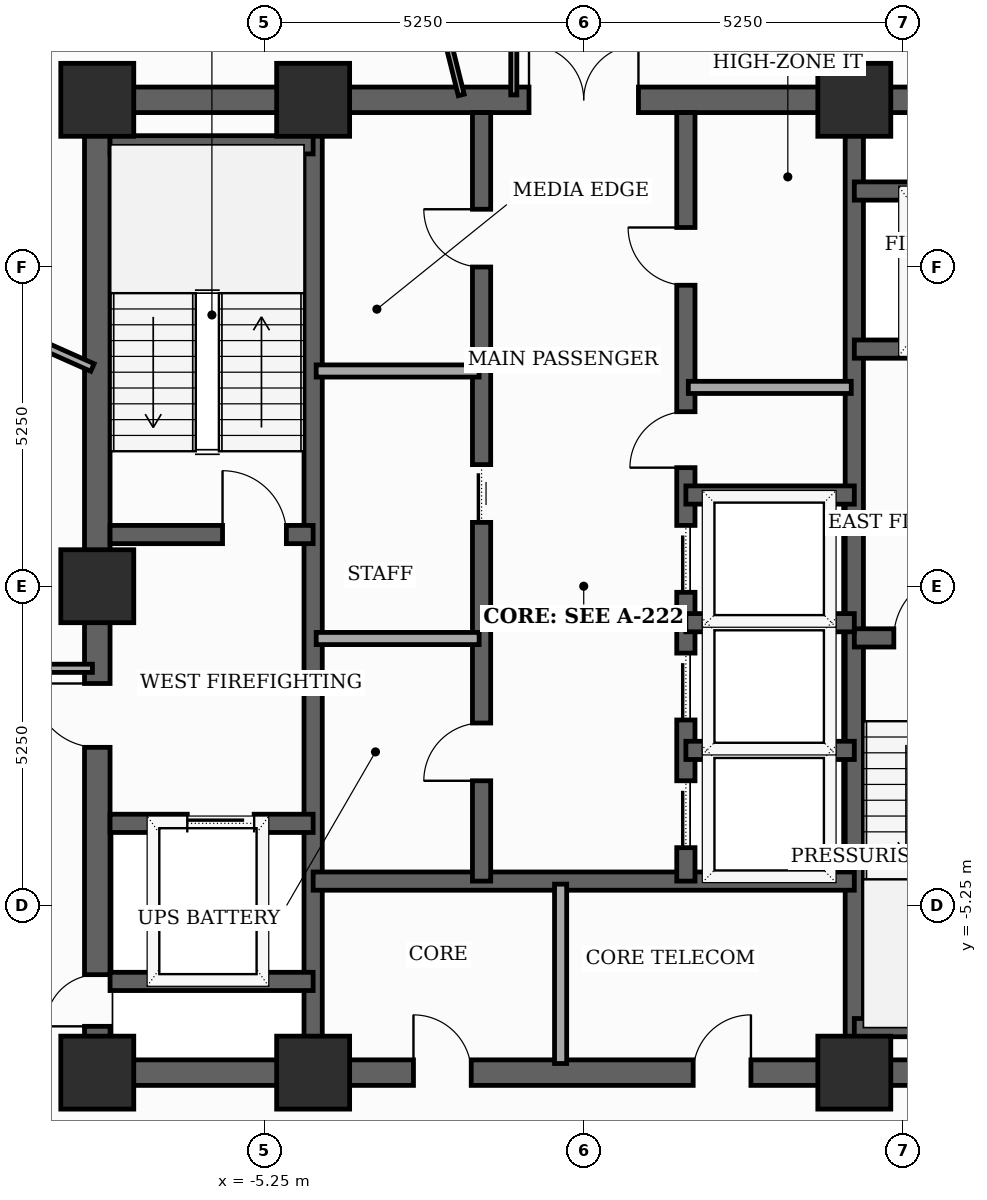
"""IFC4 building model, lengths in metres.
Left out: names, types, materials, properties, quantities, classifications, styles, units other than length and angle.
Written with IfcOpenShell. Run it as: python <this file> out.ifc"""

import sys

from ifc_helpers import new_model, si_unit, direction, frame, frame_2d, origin, origin_2d, place, context, subcontext, project, spatial, rectangle, extrude, element, fill, save


model = new_model("IFC4")
c1 = context("Model", 3, precision=1e-05, world=origin(), true_north=direction((0.0, 1.0)))
c2 = subcontext(c1, "Body", "Model", "MODEL_VIEW")
j1 = project(units=[si_unit("LENGTHUNIT", "METRE"), si_unit("PLANEANGLEUNIT", "RADIAN")], contexts=[c1])
p1 = place(None, origin())
s1 = spatial("IfcSite", under=j1, at=p1, CompositionType="ELEMENT")
p2 = place(p1, origin())
s2 = spatial("IfcBuilding", under=s1, at=p2, CompositionType="ELEMENT")
p3 = place(p2, frame((0.0, 0.0, 230.0)))
s3 = spatial("IfcBuildingStorey", under=s2, at=p3, CompositionType="ELEMENT", Elevation=230.0)
for number, where, z_axis, x_axis in (
    (1, (-8.0, -8.0, 0.0), (0.0, 0.0, 1.0), (1.0, 0.0, 0.0)),
    (2, (-4.45, -8.0, 0.0), (0.0, 0.0, 1.0), (1.0, 0.0, 0.0)),
    (3, (4.45, -8.0, 0.0), (0.0, 0.0, 1.0), (1.0, 0.0, 0.0)),
    (4, (4.45, 8.0, 0.0), (0.0, 0.0, 1.0), (1.0, 0.0, 0.0)),
    (5, (-4.45, 8.0, 0.0), (0.0, 0.0, 1.0), (1.0, 0.0, 0.0)),
    (6, (-8.0, 8.0, 0.0), (0.0, 0.0, 1.0), (1.0, 0.0, 0.0)),
    (7, (-8.0, 0.0, 0.0), (0.0, 0.0, 1.0), (1.0, 0.0, 0.0)),
):
    element("IfcColumn", number, at=place(p3, frame(where, z_axis=z_axis, x_axis=x_axis)), inside=s3, PredefinedType="COLUMN", context=c2, shape_type="SweptSolid", body=[
        extrude(rectangle(XDim=1.2, YDim=1.2, at=origin_2d()), origin(), (0.0, 0.0, 1.0), 3.7),
    ])
p4 = place(p3, frame((-8.0, -8.0, 0.0), z_axis=(0.0, 0.0, 1.0), x_axis=(0.0, 1.0, 0.0)))
e8 = element("IfcWall", 8, at=p4, inside=s3, PredefinedType="SHEAR", context=c2, shape_type="SweptSolid", body=[
    extrude(rectangle(XDim=16.0, YDim=0.42, at=frame_2d((8.0, 0.0))), origin(), (0.0, 0.0, 1.0), 3.5),
])
p5 = place(p4, frame((0.761, 0.0, 0.0)))
e9 = element("IfcOpeningElement", 9, at=p5, cuts=e8, PredefinedType="OPENING", context=c2, shape_type="SweptSolid", body=[
    extrude(rectangle(XDim=0.85, YDim=2.02, at=frame_2d((0.425, 1.01))), frame((0.0, 0.22, 0.0), z_axis=(0.0, -1.0, 0.0), x_axis=(1.0, 0.0, 0.0)), (0.0, 0.0, 1.0), 0.44),
])
p6 = place(p4, frame((5.35, 0.0, 0.0)))
e10 = element("IfcOpeningElement", 10, at=p6, cuts=e8, PredefinedType="OPENING", context=c2, shape_type="SweptSolid", body=[
    extrude(rectangle(XDim=1.05, YDim=2.15, at=frame_2d((0.525, 1.075))), frame((0.0, 0.22, 0.0), z_axis=(0.0, -1.0, 0.0), x_axis=(1.0, 0.0, 0.0)), (0.0, 0.0, 1.0), 0.44),
])
p7 = place(p3, frame((-8.0, -8.0, 0.0), z_axis=(0.0, 0.0, 1.0), x_axis=(1.0, 0.0, 0.0)))
e11 = element("IfcWall", 11, at=p7, inside=s3, PredefinedType="SHEAR", context=c2, shape_type="SweptSolid", body=[
    extrude(rectangle(XDim=16.0, YDim=0.42, at=frame_2d((8.0, 0.0))), origin(), (0.0, 0.0, 1.0), 3.5),
])
p8 = place(p7, frame((5.2, 0.0, 0.0)))
e12 = element("IfcOpeningElement", 12, at=p8, cuts=e11, PredefinedType="OPENING", context=c2, shape_type="SweptSolid", body=[
    extrude(rectangle(XDim=0.95, YDim=2.1, at=frame_2d((0.475, 1.05))), frame((0.0, 0.22, 0.0), z_axis=(0.0, -1.0, 0.0), x_axis=(1.0, 0.0, 0.0)), (0.0, 0.0, 1.0), 0.44),
])
p9 = place(p7, frame((9.8, 0.0, 0.0)))
e13 = element("IfcOpeningElement", 13, at=p9, cuts=e11, PredefinedType="OPENING", context=c2, shape_type="SweptSolid", body=[
    extrude(rectangle(XDim=0.95, YDim=2.1, at=frame_2d((0.475, 1.05))), frame((0.0, 0.22, 0.0), z_axis=(0.0, -1.0, 0.0), x_axis=(1.0, 0.0, 0.0)), (0.0, 0.0, 1.0), 0.44),
])
p10 = place(p3, frame((-8.0, 8.0, 0.0), z_axis=(0.0, 0.0, 1.0), x_axis=(1.0, 0.0, 0.0)))
e14 = element("IfcWall", 14, at=p10, inside=s3, PredefinedType="SHEAR", context=c2, shape_type="SweptSolid", body=[
    extrude(rectangle(XDim=16.0, YDim=0.42, at=frame_2d((8.0, 0.0))), origin(), (0.0, 0.0, 1.0), 3.5),
])
p11 = place(p10, frame((7.1, 0.0, 0.0)))
e15 = element("IfcOpeningElement", 15, at=p11, cuts=e14, PredefinedType="OPENING", context=c2, shape_type="SweptSolid", body=[
    extrude(rectangle(XDim=1.8, YDim=2.15, at=frame_2d((0.9, 1.075))), frame((0.0, 0.22, 0.0), z_axis=(0.0, -1.0, 0.0), x_axis=(1.0, 0.0, 0.0)), (0.0, 0.0, 1.0), 0.44),
])
for number, where, z_axis, x_axis in (
    (16, (-4.45, -7.79, 0.0), (0.0, 0.0, 1.0), (0.0, 1.0, 0.0)),
    (17, (4.45, -7.79, 0.0), (0.0, 0.0, 1.0), (0.0, 1.0, 0.0)),
):
    element("IfcWall", number, at=place(p3, frame(where, z_axis=z_axis, x_axis=x_axis)), inside=s3, PredefinedType="SHEAR", context=c2, shape_type="SweptSolid", body=[
        extrude(rectangle(XDim=15.58, YDim=0.3, at=frame_2d((7.79, 0.0))), origin(), (0.0, 0.0, 1.0), 3.5),
    ])
p12 = place(p3, frame((-7.79, 0.85, 0.0), z_axis=(0.0, 0.0, 1.0), x_axis=(1.0, 0.0, 0.0)))
e18 = element("IfcWall", 18, at=p12, inside=s3, PredefinedType="SHEAR", context=c2, shape_type="SweptSolid", body=[
    extrude(rectangle(XDim=3.34, YDim=0.3, at=frame_2d((1.67, 0.0))), origin(), (0.0, 0.0, 1.0), 3.5),
])
p13 = place(p12, frame((1.85, 0.0, 0.0)))
e19 = element("IfcOpeningElement", 19, at=p13, cuts=e18, PredefinedType="OPENING", context=c2, shape_type="SweptSolid", body=[
    extrude(rectangle(XDim=1.05, YDim=2.15, at=frame_2d((0.525, 1.075))), frame((0.0, 0.16, 0.0), z_axis=(0.0, -1.0, 0.0), x_axis=(1.0, 0.0, 0.0)), (0.0, 0.0, 1.0), 0.32),
])
p14 = place(p3, frame((-7.79, 7.26, 0.0), z_axis=(0.0, 0.0, 1.0), x_axis=(1.0, 0.0, 0.0)))
e20 = element("IfcWall", 20, at=p14, inside=s3, PredefinedType="SHEAR", context=c2, shape_type="SweptSolid", body=[
    extrude(rectangle(XDim=3.34, YDim=0.3, at=frame_2d((1.67, 0.0))), origin(), (0.0, 0.0, 1.0), 3.5),
])
p15 = place(p3, frame((4.45, -0.85, 0.0), z_axis=(0.0, 0.0, 1.0), x_axis=(1.0, 0.0, 0.0)))
e21 = element("IfcWall", 21, at=p15, inside=s3, PredefinedType="SHEAR", context=c2, shape_type="SweptSolid", body=[
    extrude(rectangle(XDim=3.34, YDim=0.3, at=frame_2d((1.67, 0.0))), origin(), (0.0, 0.0, 1.0), 3.5),
])
p16 = place(p15, frame((0.65, 0.0, 0.0)))
e22 = element("IfcOpeningElement", 22, at=p16, cuts=e21, PredefinedType="OPENING", context=c2, shape_type="SweptSolid", body=[
    extrude(rectangle(XDim=1.05, YDim=2.15, at=frame_2d((0.525, 1.075))), frame((0.0, 0.16, 0.0), z_axis=(0.0, -1.0, 0.0), x_axis=(1.0, 0.0, 0.0)), (0.0, 0.0, 1.0), 0.32),
])
p17 = place(p3, frame((4.45, -7.26, 0.0), z_axis=(0.0, 0.0, 1.0), x_axis=(1.0, 0.0, 0.0)))
e23 = element("IfcWall", 23, at=p17, inside=s3, PredefinedType="SHEAR", context=c2, shape_type="SweptSolid", body=[
    extrude(rectangle(XDim=3.55, YDim=0.3, at=frame_2d((1.775, 0.0))), origin(), (0.0, 0.0, 1.0), 3.5),
])
p18 = place(p3, frame((-7.79, -3.9, 0.0), z_axis=(0.0, 0.0, 1.0), x_axis=(1.0, 0.0, 0.0)))
e24 = element("IfcWall", 24, at=p18, inside=s3, PredefinedType="SHEAR", context=c2, shape_type="SweptSolid", body=[
    extrude(rectangle(XDim=3.34, YDim=0.3, at=frame_2d((1.67, 0.0))), origin(), (0.0, 0.0, 1.0), 3.5),
])
p19 = place(p18, frame((1.27, 0.0, 0.0)))
e25 = element("IfcOpeningElement", 25, at=p19, cuts=e24, PredefinedType="OPENING", context=c2, shape_type="SweptSolid", body=[
    extrude(rectangle(XDim=1.1, YDim=2.1, at=frame_2d((0.55, 1.05))), frame((0.0, 0.16, 0.0), z_axis=(0.0, -1.0, 0.0), x_axis=(1.0, 0.0, 0.0)), (0.0, 0.0, 1.0), 0.32),
])
p20 = place(p3, frame((-7.79, -6.5, 0.0), z_axis=(0.0, 0.0, 1.0), x_axis=(1.0, 0.0, 0.0)))
e26 = element("IfcWall", 26, at=p20, inside=s3, PredefinedType="SHEAR", context=c2, shape_type="SweptSolid", body=[
    extrude(rectangle(XDim=3.34, YDim=0.3, at=frame_2d((1.67, 0.0))), origin(), (0.0, 0.0, 1.0), 3.5),
])
p21 = place(p3, frame((4.45, 3.9, 0.0), z_axis=(0.0, 0.0, 1.0), x_axis=(1.0, 0.0, 0.0)))
e27 = element("IfcWall", 27, at=p21, inside=s3, PredefinedType="SHEAR", context=c2, shape_type="SweptSolid", body=[
    extrude(rectangle(XDim=3.34, YDim=0.3, at=frame_2d((1.67, 0.0))), origin(), (0.0, 0.0, 1.0), 3.5),
])
p22 = place(p21, frame((1.18, 0.0, 0.0)))
e28 = element("IfcOpeningElement", 28, at=p22, cuts=e27, PredefinedType="OPENING", context=c2, shape_type="SweptSolid", body=[
    extrude(rectangle(XDim=1.1, YDim=2.1, at=frame_2d((0.55, 1.05))), frame((0.0, 0.16, 0.0), z_axis=(0.0, -1.0, 0.0), x_axis=(1.0, 0.0, 0.0)), (0.0, 0.0, 1.0), 0.32),
])
p23 = place(p3, frame((4.45, 6.5, 0.0), z_axis=(0.0, 0.0, 1.0), x_axis=(1.0, 0.0, 0.0)))
e29 = element("IfcWall", 29, at=p23, inside=s3, PredefinedType="SHEAR", context=c2, shape_type="SweptSolid", body=[
    extrude(rectangle(XDim=3.34, YDim=0.3, at=frame_2d((1.67, 0.0))), origin(), (0.0, 0.0, 1.0), 3.5),
])
p24 = place(p3, frame((-4.45, -4.85, 0.0), z_axis=(0.0, 0.0, 1.0), x_axis=(1.0, 0.0, 0.0)))
e30 = element("IfcWall", 30, at=p24, inside=s3, PredefinedType="SHEAR", context=c2, shape_type="SweptSolid", body=[
    extrude(rectangle(XDim=8.9, YDim=0.3, at=frame_2d((4.45, 0.0))), origin(), (0.0, 0.0, 1.0), 3.5),
])
p25 = place(p3, frame((-1.68, -4.85, 0.0), z_axis=(0.0, 0.0, 1.0), x_axis=(0.0, 1.0, 0.0)))
e31 = element("IfcWall", 31, at=p25, inside=s3, PredefinedType="SHEAR", context=c2, shape_type="SweptSolid", body=[
    extrude(rectangle(XDim=12.64, YDim=0.3, at=frame_2d((6.32, 0.0))), origin(), (0.0, 0.0, 1.0), 3.5),
])
p26 = place(p25, frame((1.65, 0.0, 0.0)))
e32 = element("IfcOpeningElement", 32, at=p26, cuts=e31, PredefinedType="OPENING", context=c2, shape_type="SweptSolid", body=[
    extrude(rectangle(XDim=0.95, YDim=2.1, at=frame_2d((0.475, 1.05))), frame((0.0, 0.16, 0.0), z_axis=(0.0, -1.0, 0.0), x_axis=(1.0, 0.0, 0.0)), (0.0, 0.0, 1.0), 0.32),
])
p27 = place(p25, frame((5.9, 0.0, 0.0)))
e33 = element("IfcOpeningElement", 33, at=p27, cuts=e31, PredefinedType="OPENING", context=c2, shape_type="SweptSolid", body=[
    extrude(rectangle(XDim=0.95, YDim=2.1, at=frame_2d((0.475, 1.05))), frame((0.0, 0.16, 0.0), z_axis=(0.0, -1.0, 0.0), x_axis=(1.0, 0.0, 0.0)), (0.0, 0.0, 1.0), 0.32),
])
p28 = place(p25, frame((10.1, 0.0, 0.0)))
e34 = element("IfcOpeningElement", 34, at=p28, cuts=e31, PredefinedType="OPENING", context=c2, shape_type="SweptSolid", body=[
    extrude(rectangle(XDim=0.95, YDim=2.1, at=frame_2d((0.475, 1.05))), frame((0.0, 0.16, 0.0), z_axis=(0.0, -1.0, 0.0), x_axis=(1.0, 0.0, 0.0)), (0.0, 0.0, 1.0), 0.32),
])
p29 = place(p3, frame((1.68, -4.85, 0.0), z_axis=(0.0, 0.0, 1.0), x_axis=(0.0, 1.0, 0.0)))
e35 = element("IfcWall", 35, at=p29, inside=s3, PredefinedType="SHEAR", context=c2, shape_type="SweptSolid", body=[
    extrude(rectangle(XDim=12.64, YDim=0.3, at=frame_2d((6.32, 0.0))), origin(), (0.0, 0.0, 1.0), 3.5),
])
p30 = place(p29, frame((0.55, 0.0, 0.0)))
e36 = element("IfcOpeningElement", 36, at=p30, cuts=e35, PredefinedType="OPENING", context=c2, shape_type="SweptSolid", body=[
    extrude(rectangle(XDim=1.1, YDim=2.1, at=frame_2d((0.55, 1.05))), frame((0.0, 0.16, 0.0), z_axis=(0.0, -1.0, 0.0), x_axis=(1.0, 0.0, 0.0)), (0.0, 0.0, 1.0), 0.32),
])
p31 = place(p29, frame((2.65, 0.0, 0.0)))
e37 = element("IfcOpeningElement", 37, at=p31, cuts=e35, PredefinedType="OPENING", context=c2, shape_type="SweptSolid", body=[
    extrude(rectangle(XDim=1.1, YDim=2.1, at=frame_2d((0.55, 1.05))), frame((0.0, 0.16, 0.0), z_axis=(0.0, -1.0, 0.0), x_axis=(1.0, 0.0, 0.0)), (0.0, 0.0, 1.0), 0.32),
])
p32 = place(p29, frame((4.75, 0.0, 0.0)))
e38 = element("IfcOpeningElement", 38, at=p32, cuts=e35, PredefinedType="OPENING", context=c2, shape_type="SweptSolid", body=[
    extrude(rectangle(XDim=1.1, YDim=2.1, at=frame_2d((0.55, 1.05))), frame((0.0, 0.16, 0.0), z_axis=(0.0, -1.0, 0.0), x_axis=(1.0, 0.0, 0.0)), (0.0, 0.0, 1.0), 0.32),
])
p33 = place(p29, frame((6.8, 0.0, 0.0)))
e39 = element("IfcOpeningElement", 39, at=p33, cuts=e35, PredefinedType="OPENING", context=c2, shape_type="SweptSolid", body=[
    extrude(rectangle(XDim=0.92, YDim=2.1, at=frame_2d((0.46, 1.05))), frame((0.0, 0.16, 0.0), z_axis=(0.0, -1.0, 0.0), x_axis=(1.0, 0.0, 0.0)), (0.0, 0.0, 1.0), 0.32),
])
p34 = place(p29, frame((9.8, 0.0, 0.0)))
e40 = element("IfcOpeningElement", 40, at=p34, cuts=e35, PredefinedType="OPENING", context=c2, shape_type="SweptSolid", body=[
    extrude(rectangle(XDim=0.95, YDim=2.1, at=frame_2d((0.475, 1.05))), frame((0.0, 0.16, 0.0), z_axis=(0.0, -1.0, 0.0), x_axis=(1.0, 0.0, 0.0)), (0.0, 0.0, 1.0), 0.32),
])
for number, where, z_axis, x_axis in (
    (41, (1.68, 1.5, 0.0), (0.0, 0.0, 1.0), (1.0, 0.0, 0.0)),
    (42, (1.68, -2.7, 0.0), (0.0, 0.0, 1.0), (1.0, 0.0, 0.0)),
    (43, (1.68, -0.6, 0.0), (0.0, 0.0, 1.0), (1.0, 0.0, 0.0)),
):
    element("IfcWall", number, at=place(p3, frame(where, z_axis=z_axis, x_axis=x_axis)), inside=s3, PredefinedType="SHEAR", context=c2, shape_type="SweptSolid", body=[
        extrude(rectangle(XDim=2.77, YDim=0.3, at=frame_2d((1.385, 0.0))), origin(), (0.0, 0.0, 1.0), 3.5),
    ])
p35 = place(p3, frame((-0.38, -7.85, 0.0), z_axis=(0.0, 0.0, 1.0), x_axis=(0.0, 1.0, 0.0)))
e44 = element("IfcWall", 44, at=p35, inside=s3, PredefinedType="SOLIDWALL", context=c2, shape_type="SweptSolid", body=[
    extrude(rectangle(XDim=2.95, YDim=0.2, at=frame_2d((1.475, 0.0))), origin(), (0.0, 0.0, 1.0), 2.885),
])
for number, where, z_axis, x_axis in (
    (45, (-4.4, -0.86, 0.0), (0.0, 0.0, 1.0), (1.0, 0.0, 0.0)),
    (46, (-4.4, 3.54, 0.0), (0.0, 0.0, 1.0), (1.0, 0.0, 0.0)),
    (47, (1.72, 3.27, 0.0), (0.0, 0.0, 1.0), (1.0, 0.0, 0.0)),
):
    element("IfcWall", number, at=place(p3, frame(where, z_axis=z_axis, x_axis=x_axis)), inside=s3, PredefinedType="SOLIDWALL", context=c2, shape_type="SweptSolid", body=[
        extrude(rectangle(XDim=2.68, YDim=0.2, at=frame_2d((1.34, 0.0))), origin(), (0.0, 0.0, 1.0), 3.5),
    ])
p36 = place(p3, frame((-8.08, -1.35, 0.0), z_axis=(0.0, 0.0, 1.0), x_axis=(-1.0, 0.0, 0.0)))
e48 = element("IfcWall", 48, at=p36, inside=s3, PredefinedType="PARTITIONING", context=c2, shape_type="SweptSolid", body=[
    extrude(rectangle(XDim=2.57, YDim=0.135, at=frame_2d((1.285, 0.0))), origin(), (0.0, 0.0, 1.0), 2.885),
])
p37 = place(p3, frame((-1.15, 10.65, 0.0), z_axis=(0.0, 0.0, 1.0), x_axis=(0.0, -1.0, 0.0)))
e49 = element("IfcWall", 49, at=p37, inside=s3, PredefinedType="MOVABLE", context=c2, shape_type="SweptSolid", body=[
    extrude(rectangle(XDim=2.57, YDim=0.1, at=frame_2d((1.285, 0.0))), origin(), (0.0, 0.0, 1.0), 2.885),
])
p38 = place(p3, frame((-8.08, 3.597, 0.0), z_axis=(0.0, 0.0, 1.0), x_axis=(-0.913494385598, 0.40685133339, 0.0)))
e50 = element("IfcWall", 50, at=p38, inside=s3, PredefinedType="PARTITIONING", context=c2, shape_type="SweptSolid", body=[
    extrude(rectangle(XDim=6.894, YDim=0.135, at=frame_2d((3.447, 0.0))), origin(), (0.0, 0.0, 1.0), 2.885),
])
p39 = place(p3, frame((-3.808, 15.271, 0.0), z_axis=(0.0, 0.0, 1.0), x_axis=(0.241993010569, -0.970277992555, 0.0)))
e51 = element("IfcWall", 51, at=p39, inside=s3, PredefinedType="MOVABLE", context=c2, shape_type="SweptSolid", body=[
    extrude(rectangle(XDim=7.411, YDim=0.1, at=frame_2d((3.706, 0.0))), origin(), (0.0, 0.0, 1.0), 2.885),
])
p40 = place(p39, frame((3.246, 0.0, 0.0)))
e52 = element("IfcOpeningElement", 52, at=p40, cuts=e51, PredefinedType="OPENING", context=c2, shape_type="SweptSolid", body=[
    extrude(rectangle(XDim=0.92, YDim=2.1, at=frame_2d((0.46, 1.05))), frame((0.0, 0.06, 0.0), z_axis=(0.0, -1.0, 0.0), x_axis=(1.0, 0.0, 0.0)), (0.0, 0.0, 1.0), 0.12),
])
p41 = place(p5, origin())
e53 = element("IfcDoor", 53, at=p41, inside=s3, OperationType="SINGLE_SWING_LEFT", PredefinedType="TRAPDOOR", context=c2, shape_type="SweptSolid", body=[
    extrude(rectangle(XDim=0.85, YDim=2.02, at=frame_2d((0.425, 1.01))), frame((0.0, 0.025, 0.0), z_axis=(0.0, -1.0, 0.0), x_axis=(1.0, 0.0, 0.0)), (0.0, 0.0, 1.0), 0.05),
])
fill(e9, e53)
p42 = place(p6, origin())
e54 = element("IfcDoor", 54, at=p42, inside=s3, OperationType="SINGLE_SWING_RIGHT", PredefinedType="DOOR", context=c2, shape_type="SweptSolid", body=[
    extrude(rectangle(XDim=1.05, YDim=2.15, at=frame_2d((0.525, 1.075))), frame((0.0, 0.025, 0.0), z_axis=(0.0, -1.0, 0.0), x_axis=(1.0, 0.0, 0.0)), (0.0, 0.0, 1.0), 0.05),
])
fill(e10, e54)
p43 = place(p8, origin())
e55 = element("IfcDoor", 55, at=p43, inside=s3, OperationType="SINGLE_SWING_LEFT", PredefinedType="DOOR", context=c2, shape_type="SweptSolid", body=[
    extrude(rectangle(XDim=0.95, YDim=2.1, at=frame_2d((0.475, 1.05))), frame((0.0, 0.025, 0.0), z_axis=(0.0, -1.0, 0.0), x_axis=(1.0, 0.0, 0.0)), (0.0, 0.0, 1.0), 0.05),
])
fill(e12, e55)
p44 = place(p9, origin())
e56 = element("IfcDoor", 56, at=p44, inside=s3, OperationType="SINGLE_SWING_RIGHT", PredefinedType="DOOR", context=c2, shape_type="SweptSolid", body=[
    extrude(rectangle(XDim=0.95, YDim=2.1, at=frame_2d((0.475, 1.05))), frame((0.0, 0.025, 0.0), z_axis=(0.0, -1.0, 0.0), x_axis=(1.0, 0.0, 0.0)), (0.0, 0.0, 1.0), 0.05),
])
fill(e13, e56)
p45 = place(p11, origin())
e57 = element("IfcDoor", 57, at=p45, inside=s3, OperationType="DOUBLE_DOOR_SINGLE_SWING", PredefinedType="DOOR", context=c2, shape_type="SweptSolid", body=[
    extrude(rectangle(XDim=1.8, YDim=2.15, at=frame_2d((0.9, 1.075))), frame((0.0, 0.025, 0.0), z_axis=(0.0, -1.0, 0.0), x_axis=(1.0, 0.0, 0.0)), (0.0, 0.0, 1.0), 0.05),
])
fill(e15, e57)
p46 = place(p13, origin())
e58 = element("IfcDoor", 58, at=p46, inside=s3, OperationType="SINGLE_SWING_LEFT", PredefinedType="DOOR", context=c2, shape_type="SweptSolid", body=[
    extrude(rectangle(XDim=1.05, YDim=2.15, at=frame_2d((0.525, 1.075))), frame((0.0, 0.025, 0.0), z_axis=(0.0, -1.0, 0.0), x_axis=(1.0, 0.0, 0.0)), (0.0, 0.0, 1.0), 0.05),
])
fill(e19, e58)
p47 = place(p16, origin())
e59 = element("IfcDoor", 59, at=p47, inside=s3, OperationType="SINGLE_SWING_RIGHT", PredefinedType="DOOR", context=c2, shape_type="SweptSolid", body=[
    extrude(rectangle(XDim=1.05, YDim=2.15, at=frame_2d((0.525, 1.075))), frame((0.0, 0.025, 0.0), z_axis=(0.0, -1.0, 0.0), x_axis=(1.0, 0.0, 0.0)), (0.0, 0.0, 1.0), 0.05),
])
fill(e22, e59)
p48 = place(p19, origin())
e60 = element("IfcDoor", 60, at=p48, inside=s3, OperationType="SLIDING_TO_LEFT", PredefinedType="DOOR", context=c2, shape_type="SweptSolid", body=[
    extrude(rectangle(XDim=1.1, YDim=2.1, at=frame_2d((0.55, 1.05))), frame((0.0, 0.025, 0.0), z_axis=(0.0, -1.0, 0.0), x_axis=(1.0, 0.0, 0.0)), (0.0, 0.0, 1.0), 0.05),
])
fill(e25, e60)
p49 = place(p26, origin())
e61 = element("IfcDoor", 61, at=p49, inside=s3, OperationType="SINGLE_SWING_LEFT", PredefinedType="DOOR", context=c2, shape_type="SweptSolid", body=[
    extrude(rectangle(XDim=0.95, YDim=2.1, at=frame_2d((0.475, 1.05))), frame((0.0, 0.025, 0.0), z_axis=(0.0, -1.0, 0.0), x_axis=(1.0, 0.0, 0.0)), (0.0, 0.0, 1.0), 0.05),
])
fill(e32, e61)
p50 = place(p27, origin())
e62 = element("IfcDoor", 62, at=p50, inside=s3, OperationType="SLIDING_TO_LEFT", PredefinedType="DOOR", context=c2, shape_type="SweptSolid", body=[
    extrude(rectangle(XDim=0.95, YDim=2.1, at=frame_2d((0.475, 1.05))), frame((0.0, 0.025, 0.0), z_axis=(0.0, -1.0, 0.0), x_axis=(1.0, 0.0, 0.0)), (0.0, 0.0, 1.0), 0.05),
])
fill(e33, e62)
p51 = place(p28, origin())
e63 = element("IfcDoor", 63, at=p51, inside=s3, OperationType="SINGLE_SWING_RIGHT", PredefinedType="DOOR", context=c2, shape_type="SweptSolid", body=[
    extrude(rectangle(XDim=0.95, YDim=2.1, at=frame_2d((0.475, 1.05))), frame((0.0, 0.025, 0.0), z_axis=(0.0, -1.0, 0.0), x_axis=(1.0, 0.0, 0.0)), (0.0, 0.0, 1.0), 0.05),
])
fill(e34, e63)
p52 = place(p30, origin())
e64 = element("IfcDoor", 64, at=p52, inside=s3, OperationType="SLIDING_TO_LEFT", PredefinedType="DOOR", context=c2, shape_type="SweptSolid", body=[
    extrude(rectangle(XDim=1.1, YDim=2.1, at=frame_2d((0.55, 1.05))), frame((0.0, 0.025, 0.0), z_axis=(0.0, -1.0, 0.0), x_axis=(1.0, 0.0, 0.0)), (0.0, 0.0, 1.0), 0.05),
])
fill(e36, e64)
p53 = place(p31, origin())
e65 = element("IfcDoor", 65, at=p53, inside=s3, OperationType="SLIDING_TO_LEFT", PredefinedType="DOOR", context=c2, shape_type="SweptSolid", body=[
    extrude(rectangle(XDim=1.1, YDim=2.1, at=frame_2d((0.55, 1.05))), frame((0.0, 0.025, 0.0), z_axis=(0.0, -1.0, 0.0), x_axis=(1.0, 0.0, 0.0)), (0.0, 0.0, 1.0), 0.05),
])
fill(e37, e65)
p54 = place(p32, origin())
e66 = element("IfcDoor", 66, at=p54, inside=s3, OperationType="SLIDING_TO_LEFT", PredefinedType="DOOR", context=c2, shape_type="SweptSolid", body=[
    extrude(rectangle(XDim=1.1, YDim=2.1, at=frame_2d((0.55, 1.05))), frame((0.0, 0.025, 0.0), z_axis=(0.0, -1.0, 0.0), x_axis=(1.0, 0.0, 0.0)), (0.0, 0.0, 1.0), 0.05),
])
fill(e38, e66)
p55 = place(p33, origin())
e67 = element("IfcDoor", 67, at=p55, inside=s3, OperationType="SINGLE_SWING_LEFT", PredefinedType="DOOR", context=c2, shape_type="SweptSolid", body=[
    extrude(rectangle(XDim=0.92, YDim=2.1, at=frame_2d((0.46, 1.05))), frame((0.0, 0.025, 0.0), z_axis=(0.0, -1.0, 0.0), x_axis=(1.0, 0.0, 0.0)), (0.0, 0.0, 1.0), 0.05),
])
fill(e39, e67)
p56 = place(p34, origin())
e68 = element("IfcDoor", 68, at=p56, inside=s3, OperationType="SINGLE_SWING_RIGHT", PredefinedType="DOOR", context=c2, shape_type="SweptSolid", body=[
    extrude(rectangle(XDim=0.95, YDim=2.1, at=frame_2d((0.475, 1.05))), frame((0.0, 0.025, 0.0), z_axis=(0.0, -1.0, 0.0), x_axis=(1.0, 0.0, 0.0)), (0.0, 0.0, 1.0), 0.05),
])
fill(e40, e68)
save(model, sys.argv[1])
